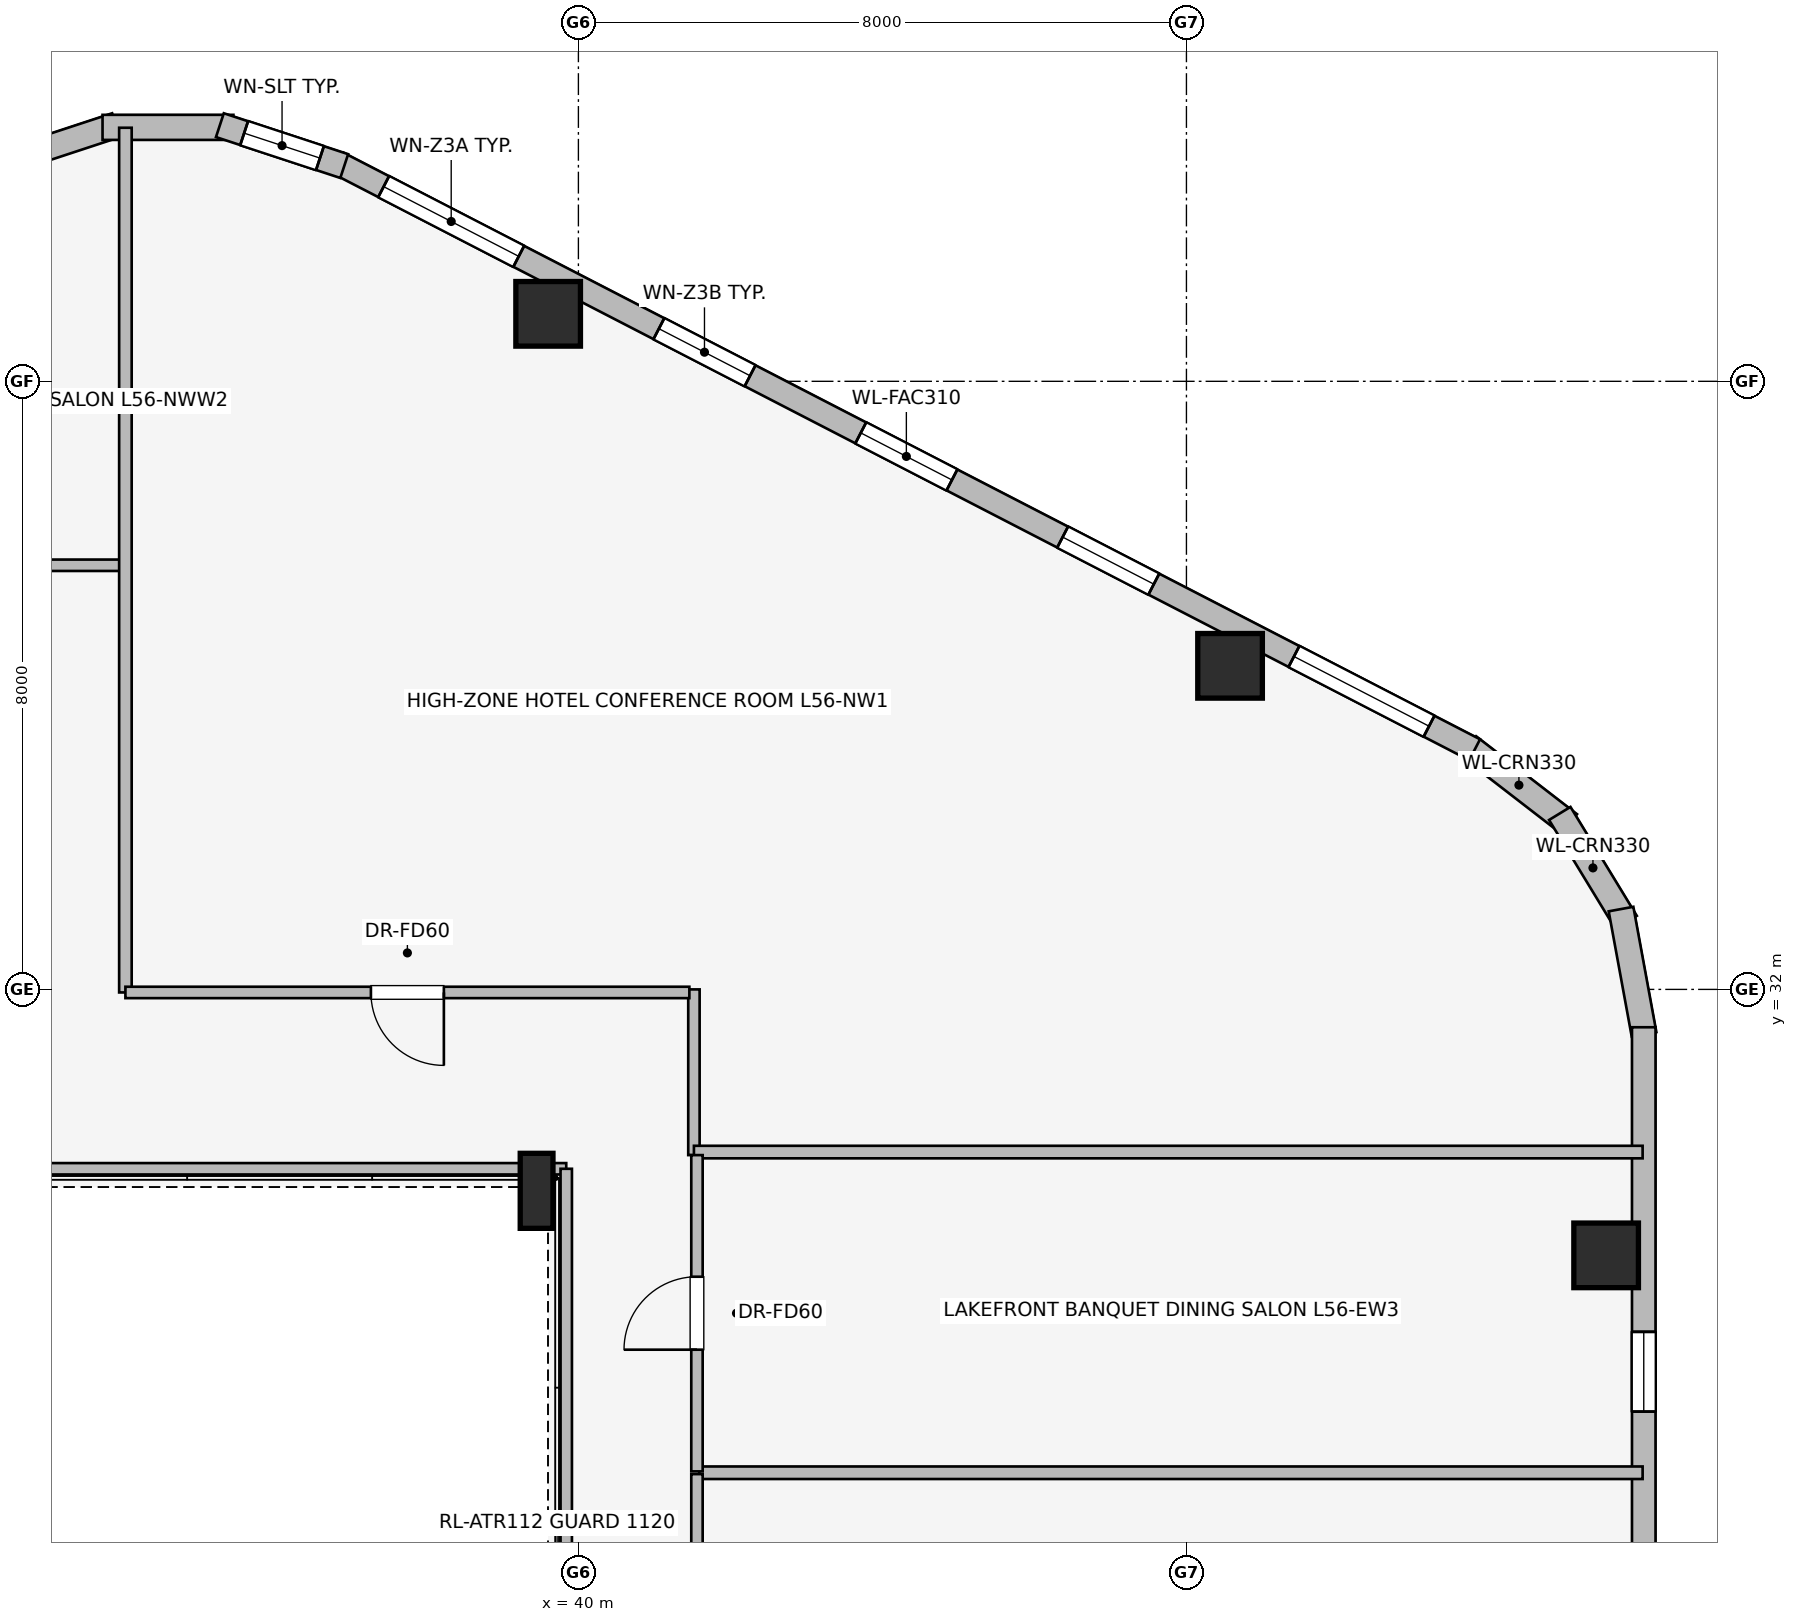
"""IFC4 building model, lengths in metres.
Left out: names, types, materials, properties, quantities, classifications, styles, units other than length and angle.
Written with IfcOpenShell. Run it as: python <this file> out.ifc"""

import sys

from ifc_helpers import new_model, si_unit, direction, frame, frame_2d, origin, origin_2d, place, context, subcontext, project, spatial, rectangle, i_section, extrude, element, fill, save


model = new_model("IFC4")
c1 = context("Model", 3, precision=1e-05, world=origin(), true_north=direction((0.0, 1.0)))
c2 = subcontext(c1, "Body", "Model", "MODEL_VIEW")
j1 = project(units=[si_unit("LENGTHUNIT", "METRE"), si_unit("PLANEANGLEUNIT", "RADIAN")], contexts=[c1])
p1 = place(None, origin())
s1 = spatial("IfcSite", under=j1, at=p1, CompositionType="ELEMENT")
p2 = place(p1, origin())
s2 = spatial("IfcBuilding", under=s1, at=p2, CompositionType="ELEMENT")
p3 = place(p2, frame((0.0, 0.0, 206.8)))
s3 = spatial("IfcBuildingStorey", under=s2, at=p3, CompositionType="ELEMENT", Elevation=206.8)
for number, where, z_axis, x_axis in (
    (1, (48.574, 36.257, 0.0), (0.0, 0.0, 1.0), (1.0, 0.0, 0.0)),
    (2, (39.602, 40.888, 0.0), (0.0, 0.0, 1.0), (1.0, 0.0, 0.0)),
    (3, (53.522, 28.501, 0.0), (0.0, 0.0, 1.0), (1.0, 0.0, 0.0)),
):
    element("IfcColumn", number, at=place(p3, frame(where, z_axis=z_axis, x_axis=x_axis)), inside=s3, PredefinedType="COLUMN", context=c2, shape_type="SweptSolid", body=[
        extrude(rectangle(XDim=0.85, YDim=0.85, at=origin_2d()), origin(), (0.0, 0.0, 1.0), 3.45),
    ])
p4 = place(p3, frame((39.45, 29.35, 0.0), z_axis=(0.0, 0.0, 1.0), x_axis=(1.0, 0.0, 0.0)))
e4 = element("IfcColumn", 4, at=p4, inside=s3, PredefinedType="COLUMN", context=c2, shape_type="SweptSolid", body=[
    extrude(i_section(OverallWidth=0.431, OverallDepth=0.987, WebThickness=0.034, FlangeThickness=0.062, at=origin_2d()), origin(), (0.0, 0.0, 1.0), 3.45),
])
p5 = place(p3, frame((51.711, 35.2, 0.0), z_axis=(0.0, 0.0, 1.0), x_axis=(0.791464279355, -0.611215423976, 0.0)))
e5 = element("IfcWall", 5, at=p5, inside=s3, PredefinedType="STANDARD", context=c2, shape_type="SweptSolid", body=[
    extrude(rectangle(XDim=1.677, YDim=0.33, at=frame_2d((0.838, 0.0))), origin(), (0.0, 0.0, 1.0), 3.19),
])
p6 = place(p3, frame((52.912, 34.315, 0.0), z_axis=(0.0, 0.0, 1.0), x_axis=(0.520219286058, -0.85403272444, 0.0)))
e6 = element("IfcWall", 6, at=p6, inside=s3, PredefinedType="STANDARD", context=c2, shape_type="SweptSolid", body=[
    extrude(rectangle(XDim=1.678, YDim=0.33, at=frame_2d((0.839, 0.0))), origin(), (0.0, 0.0, 1.0), 3.19),
])
p7 = place(p3, frame((53.718, 33.057, 0.0), z_axis=(0.0, 0.0, 1.0), x_axis=(0.180717642671, -0.983535019014, 0.0)))
e7 = element("IfcWall", 7, at=p7, inside=s3, PredefinedType="STANDARD", context=c2, shape_type="SweptSolid", body=[
    extrude(rectangle(XDim=1.677, YDim=0.33, at=frame_2d((0.838, 0.0))), origin(), (0.0, 0.0, 1.0), 3.19),
])
p8 = place(p3, frame((36.838, 42.871, 0.0), z_axis=(0.0, 0.0, 1.0), x_axis=(0.888626188278, -0.458632202867, 0.0)))
e8 = element("IfcWall", 8, at=p8, inside=s3, PredefinedType="STANDARD", context=c2, shape_type="SweptSolid", body=[
    extrude(rectangle(XDim=16.828, YDim=0.31, at=frame_2d((8.414, 0.0))), origin(), (0.0, 0.0, 1.0), 3.19),
])
p9 = place(p8, frame((0.675, 0.0, 0.75)))
e9 = element("IfcOpeningElement", 9, at=p9, cuts=e8, PredefinedType="OPENING", context=c2, shape_type="SweptSolid", body=[
    extrude(rectangle(XDim=2.0, YDim=1.5, at=frame_2d((1.0, 0.75))), frame((0.0, 0.165, 0.0), z_axis=(0.0, -1.0, 0.0), x_axis=(1.0, 0.0, 0.0)), (0.0, 0.0, 1.0), 0.33),
])
p10 = place(p8, frame((4.75, 0.0, 0.75)))
e10 = element("IfcOpeningElement", 10, at=p10, cuts=e8, PredefinedType="OPENING", context=c2, shape_type="SweptSolid", body=[
    extrude(rectangle(XDim=1.35, YDim=1.45, at=frame_2d((0.675, 0.725))), frame((0.0, 0.165, 0.0), z_axis=(0.0, -1.0, 0.0), x_axis=(1.0, 0.0, 0.0)), (0.0, 0.0, 1.0), 0.33),
])
p11 = place(p8, frame((7.739, 0.0, 0.75)))
e11 = element("IfcOpeningElement", 11, at=p11, cuts=e8, PredefinedType="OPENING", context=c2, shape_type="SweptSolid", body=[
    extrude(rectangle(XDim=1.35, YDim=1.45, at=frame_2d((0.675, 0.725))), frame((0.0, 0.165, 0.0), z_axis=(0.0, -1.0, 0.0), x_axis=(1.0, 0.0, 0.0)), (0.0, 0.0, 1.0), 0.33),
])
p12 = place(p8, frame((10.728, 0.0, 0.75)))
e12 = element("IfcOpeningElement", 12, at=p12, cuts=e8, PredefinedType="OPENING", context=c2, shape_type="SweptSolid", body=[
    extrude(rectangle(XDim=1.35, YDim=1.45, at=frame_2d((0.675, 0.725))), frame((0.0, 0.165, 0.0), z_axis=(0.0, -1.0, 0.0), x_axis=(1.0, 0.0, 0.0)), (0.0, 0.0, 1.0), 0.33),
])
p13 = place(p8, frame((14.153, 0.0, 0.75)))
e13 = element("IfcOpeningElement", 13, at=p13, cuts=e8, PredefinedType="OPENING", context=c2, shape_type="SweptSolid", body=[
    extrude(rectangle(XDim=2.0, YDim=1.5, at=frame_2d((1.0, 0.75))), frame((0.0, 0.165, 0.0), z_axis=(0.0, -1.0, 0.0), x_axis=(1.0, 0.0, 0.0)), (0.0, 0.0, 1.0), 0.33),
])
p14 = place(p3, frame((32.281, 42.832, 0.0), z_axis=(0.0, 0.0, 1.0), x_axis=(0.949937416267, 0.312440242569, 0.0)))
e14 = element("IfcWall", 14, at=p14, inside=s3, PredefinedType="STANDARD", context=c2, shape_type="SweptSolid", body=[
    extrude(rectangle(XDim=1.722, YDim=0.33, at=frame_2d((0.861, 0.0))), origin(), (0.0, 0.0, 1.0), 3.19),
])
p15 = place(p3, frame((33.739, 43.341, 0.0), z_axis=(0.0, 0.0, 1.0), x_axis=(1.0, 0.0, 0.0)))
e15 = element("IfcWall", 15, at=p15, inside=s3, PredefinedType="STANDARD", context=c2, shape_type="SweptSolid", body=[
    extrude(rectangle(XDim=1.722, YDim=0.33, at=frame_2d((0.861, 0.0))), origin(), (0.0, 0.0, 1.0), 3.19),
])
p16 = place(p3, frame((35.283, 43.37, 0.0), z_axis=(0.0, 0.0, 1.0), x_axis=(0.949937416267, -0.312440242569, 0.0)))
e16 = element("IfcWall", 16, at=p16, inside=s3, PredefinedType="STANDARD", context=c2, shape_type="SweptSolid", body=[
    extrude(rectangle(XDim=1.722, YDim=0.33, at=frame_2d((0.861, 0.0))), origin(), (0.0, 0.0, 1.0), 3.19),
])
p17 = place(p16, frame((0.336, 0.0, 0.75)))
e17 = element("IfcOpeningElement", 17, at=p17, cuts=e16, PredefinedType="OPENING", context=c2, shape_type="SweptSolid", body=[
    extrude(rectangle(XDim=1.05, YDim=1.4, at=frame_2d((0.525, 0.7))), frame((0.0, 0.175, 0.0), z_axis=(0.0, -1.0, 0.0), x_axis=(1.0, 0.0, 0.0)), (0.0, 0.0, 1.0), 0.35),
])
p18 = place(p3, frame((54.017, 31.502, 0.0), z_axis=(0.0, 0.0, 1.0), x_axis=(0.0, -1.0, 0.0)))
e18 = element("IfcWall", 18, at=p18, inside=s3, PredefinedType="STANDARD", context=c2, shape_type="SweptSolid", body=[
    extrude(rectangle(XDim=15.004, YDim=0.31, at=frame_2d((7.502, 0.0))), origin(), (0.0, 0.0, 1.0), 3.19),
])
p19 = place(p18, frame((4.007, 0.0, 0.75)))
e19 = element("IfcOpeningElement", 19, at=p19, cuts=e18, PredefinedType="OPENING", context=c2, shape_type="SweptSolid", body=[
    extrude(rectangle(XDim=1.05, YDim=1.4, at=frame_2d((0.525, 0.7))), frame((0.0, 0.165, 0.0), z_axis=(0.0, -1.0, 0.0), x_axis=(1.0, 0.0, 0.0)), (0.0, 0.0, 1.0), 0.33),
])
p20 = place(p18, frame((6.833, 0.0, 0.75)))
e20 = element("IfcOpeningElement", 20, at=p20, cuts=e18, PredefinedType="OPENING", context=c2, shape_type="SweptSolid", body=[
    extrude(rectangle(XDim=1.35, YDim=1.45, at=frame_2d((0.675, 0.725))), frame((0.0, 0.165, 0.0), z_axis=(0.0, -1.0, 0.0), x_axis=(1.0, 0.0, 0.0)), (0.0, 0.0, 1.0), 0.33),
])
p21 = place(p18, frame((9.953, 0.0, 0.75)))
e21 = element("IfcOpeningElement", 21, at=p21, cuts=e18, PredefinedType="OPENING", context=c2, shape_type="SweptSolid", body=[
    extrude(rectangle(XDim=1.05, YDim=1.4, at=frame_2d((0.525, 0.7))), frame((0.0, 0.165, 0.0), z_axis=(0.0, -1.0, 0.0), x_axis=(1.0, 0.0, 0.0)), (0.0, 0.0, 1.0), 0.33),
])
p22 = place(p3, frame((39.84, 29.64, 0.0), z_axis=(0.0, 0.0, 1.0), x_axis=(-1.0, 0.0, 0.0)))
e22 = element("IfcWall", 22, at=p22, inside=s3, PredefinedType="PARTITIONING", context=c2, shape_type="SweptSolid", body=[
    extrude(rectangle(XDim=12.203, YDim=0.15, at=frame_2d((6.102, 0.0))), origin(), (0.0, 0.0, 1.0), 2.331),
])
p23 = place(p3, frame((39.84, 18.36, 0.0), z_axis=(0.0, 0.0, 1.0), x_axis=(0.0, 1.0, 0.0)))
e23 = element("IfcWall", 23, at=p23, inside=s3, PredefinedType="PARTITIONING", context=c2, shape_type="SweptSolid", body=[
    extrude(rectangle(XDim=11.28, YDim=0.15, at=frame_2d((5.64, 0.0))), origin(), (0.0, 0.0, 1.0), 3.19),
])
p24 = place(p3, frame((33.962, 37.58, 0.0), z_axis=(0.0, 0.0, 1.0), x_axis=(-1.0, 0.0, 0.0)))
e24 = element("IfcWall", 24, at=p24, inside=s3, PredefinedType="PARTITIONING", context=c2, shape_type="SweptSolid", body=[
    extrude(rectangle(XDim=5.836, YDim=0.15, at=frame_2d((2.918, 0.0))), origin(), (0.0, 0.0, 1.0), 2.582),
])
p25 = place(p24, frame((2.663, 0.0, 0.0)))
e25 = element("IfcOpeningElement", 25, at=p25, cuts=e24, PredefinedType="OPENING", context=c2, shape_type="SweptSolid", body=[
    extrude(rectangle(XDim=0.96, YDim=2.0, at=frame_2d((0.48, 1.0))), frame((0.0, 0.085, 0.0), z_axis=(0.0, -1.0, 0.0), x_axis=(1.0, 0.0, 0.0)), (0.0, 0.0, 1.0), 0.17),
])
p26 = place(p3, frame((34.04, 31.96, 0.0), z_axis=(0.0, 0.0, 1.0), x_axis=(0.0, 1.0, 0.0)))
e26 = element("IfcWall", 26, at=p26, inside=s3, PredefinedType="PARTITIONING", context=c2, shape_type="SweptSolid", body=[
    extrude(rectangle(XDim=11.376, YDim=0.165, at=frame_2d((5.688, 0.0))), origin(), (0.0, 0.0, 1.0), 3.19),
])
p27 = place(p3, frame((41.52, 29.82, 0.0), z_axis=(0.0, 0.0, 1.0), x_axis=(0.0, 1.0, 0.0)))
e27 = element("IfcWall", 27, at=p27, inside=s3, PredefinedType="PARTITIONING", context=c2, shape_type="SweptSolid", body=[
    extrude(rectangle(XDim=2.18, YDim=0.15, at=frame_2d((1.09, 0.0))), origin(), (0.0, 0.0, 1.0), 3.19),
])
p28 = place(p3, frame((41.46, 31.96, 0.0), z_axis=(0.0, 0.0, 1.0), x_axis=(-1.0, 0.0, 0.0)))
e28 = element("IfcWall", 28, at=p28, inside=s3, PredefinedType="PARTITIONING", context=c2, shape_type="SweptSolid", body=[
    extrude(rectangle(XDim=7.42, YDim=0.15, at=frame_2d((3.71, 0.0))), origin(), (0.0, 0.0, 1.0), 3.19),
])
p29 = place(p28, frame((3.23, 0.0, 0.0)))
e29 = element("IfcOpeningElement", 29, at=p29, cuts=e28, PredefinedType="OPENING", context=c2, shape_type="SweptSolid", body=[
    extrude(rectangle(XDim=0.96, YDim=2.0, at=frame_2d((0.48, 1.0))), frame((0.0, 0.085, 0.0), z_axis=(0.0, -1.0, 0.0), x_axis=(1.0, 0.0, 0.0)), (0.0, 0.0, 1.0), 0.17),
])
p30 = place(p3, frame((41.52, 29.86, 0.0), z_axis=(0.0, 0.0, 1.0), x_axis=(1.0, 0.0, 0.0)))
e30 = element("IfcWall", 30, at=p30, inside=s3, PredefinedType="PARTITIONING", context=c2, shape_type="SweptSolid", body=[
    extrude(rectangle(XDim=12.482, YDim=0.165, at=frame_2d((6.241, 0.0))), origin(), (0.0, 0.0, 1.0), 3.19),
])
p31 = place(p3, frame((41.59, 25.641, 0.0), z_axis=(0.0, 0.0, 1.0), x_axis=(1.0, 0.0, 0.0)))
e31 = element("IfcWall", 31, at=p31, inside=s3, PredefinedType="PARTITIONING", context=c2, shape_type="SweptSolid", body=[
    extrude(rectangle(XDim=12.412, YDim=0.165, at=frame_2d((6.206, 0.0))), origin(), (0.0, 0.0, 1.0), 3.19),
])
p32 = place(p3, frame((41.56, 22.365, 0.0), z_axis=(0.0, 0.0, 1.0), x_axis=(0.0, 1.0, 0.0)))
e32 = element("IfcWall", 32, at=p32, inside=s3, PredefinedType="PARTITIONING", context=c2, shape_type="SweptSolid", body=[
    extrude(rectangle(XDim=3.258, YDim=0.15, at=frame_2d((1.629, 0.0))), origin(), (0.0, 0.0, 1.0), 3.19),
])
p33 = place(p32, frame((1.149, 0.0, 0.0)))
e33 = element("IfcOpeningElement", 33, at=p33, cuts=e32, PredefinedType="OPENING", context=c2, shape_type="SweptSolid", body=[
    extrude(rectangle(XDim=0.96, YDim=2.0, at=frame_2d((0.48, 1.0))), frame((0.0, 0.085, 0.0), z_axis=(0.0, -1.0, 0.0), x_axis=(1.0, 0.0, 0.0)), (0.0, 0.0, 1.0), 0.17),
])
p34 = place(p3, frame((41.56, 25.659, 0.0), z_axis=(0.0, 0.0, 1.0), x_axis=(0.0, 1.0, 0.0)))
e34 = element("IfcWall", 34, at=p34, inside=s3, PredefinedType="PARTITIONING", context=c2, shape_type="SweptSolid", body=[
    extrude(rectangle(XDim=4.161, YDim=0.15, at=frame_2d((2.081, 0.0))), origin(), (0.0, 0.0, 1.0), 3.19),
])
p35 = place(p34, frame((1.601, 0.0, 0.0)))
e35 = element("IfcOpeningElement", 35, at=p35, cuts=e34, PredefinedType="OPENING", context=c2, shape_type="SweptSolid", body=[
    extrude(rectangle(XDim=0.96, YDim=2.0, at=frame_2d((0.48, 1.0))), frame((0.0, 0.085, 0.0), z_axis=(0.0, -1.0, 0.0), x_axis=(1.0, 0.0, 0.0)), (0.0, 0.0, 1.0), 0.17),
])
p36 = place(p9, origin())
e36 = element("IfcWindow", 36, at=p36, inside=s3, PartitioningType="SINGLE_PANEL", PredefinedType="WINDOW", context=c2, shape_type="SweptSolid", body=[
    extrude(rectangle(XDim=2.0, YDim=1.5, at=frame_2d((1.0, 0.75))), frame((0.0, 0.03, 0.0), z_axis=(0.0, -1.0, 0.0), x_axis=(1.0, 0.0, 0.0)), (0.0, 0.0, 1.0), 0.06),
])
fill(e9, e36)
p37 = place(p10, origin())
e37 = element("IfcWindow", 37, at=p37, inside=s3, PartitioningType="SINGLE_PANEL", PredefinedType="WINDOW", context=c2, shape_type="SweptSolid", body=[
    extrude(rectangle(XDim=1.35, YDim=1.45, at=frame_2d((0.675, 0.725))), frame((0.0, 0.03, 0.0), z_axis=(0.0, -1.0, 0.0), x_axis=(1.0, 0.0, 0.0)), (0.0, 0.0, 1.0), 0.06),
])
fill(e10, e37)
p38 = place(p11, origin())
e38 = element("IfcWindow", 38, at=p38, inside=s3, PartitioningType="SINGLE_PANEL", PredefinedType="WINDOW", context=c2, shape_type="SweptSolid", body=[
    extrude(rectangle(XDim=1.35, YDim=1.45, at=frame_2d((0.675, 0.725))), frame((0.0, 0.03, 0.0), z_axis=(0.0, -1.0, 0.0), x_axis=(1.0, 0.0, 0.0)), (0.0, 0.0, 1.0), 0.06),
])
fill(e11, e38)
p39 = place(p12, origin())
e39 = element("IfcWindow", 39, at=p39, inside=s3, PartitioningType="SINGLE_PANEL", PredefinedType="WINDOW", context=c2, shape_type="SweptSolid", body=[
    extrude(rectangle(XDim=1.35, YDim=1.45, at=frame_2d((0.675, 0.725))), frame((0.0, 0.03, 0.0), z_axis=(0.0, -1.0, 0.0), x_axis=(1.0, 0.0, 0.0)), (0.0, 0.0, 1.0), 0.06),
])
fill(e12, e39)
p40 = place(p13, origin())
e40 = element("IfcWindow", 40, at=p40, inside=s3, PartitioningType="SINGLE_PANEL", PredefinedType="WINDOW", context=c2, shape_type="SweptSolid", body=[
    extrude(rectangle(XDim=2.0, YDim=1.5, at=frame_2d((1.0, 0.75))), frame((0.0, 0.03, 0.0), z_axis=(0.0, -1.0, 0.0), x_axis=(1.0, 0.0, 0.0)), (0.0, 0.0, 1.0), 0.06),
])
fill(e13, e40)
p41 = place(p17, origin())
e41 = element("IfcWindow", 41, at=p41, inside=s3, PartitioningType="SINGLE_PANEL", PredefinedType="WINDOW", context=c2, shape_type="SweptSolid", body=[
    extrude(rectangle(XDim=1.05, YDim=1.4, at=frame_2d((0.525, 0.7))), frame((0.0, 0.03, 0.0), z_axis=(0.0, -1.0, 0.0), x_axis=(1.0, 0.0, 0.0)), (0.0, 0.0, 1.0), 0.06),
])
fill(e17, e41)
p42 = place(p19, origin())
e42 = element("IfcWindow", 42, at=p42, inside=s3, PartitioningType="SINGLE_PANEL", PredefinedType="WINDOW", context=c2, shape_type="SweptSolid", body=[
    extrude(rectangle(XDim=1.05, YDim=1.4, at=frame_2d((0.525, 0.7))), frame((0.0, 0.03, 0.0), z_axis=(0.0, -1.0, 0.0), x_axis=(1.0, 0.0, 0.0)), (0.0, 0.0, 1.0), 0.06),
])
fill(e19, e42)
p43 = place(p29, origin())
e43 = element("IfcDoor", 43, at=p43, inside=s3, OperationType="SINGLE_SWING_LEFT", PredefinedType="DOOR", context=c2, shape_type="SweptSolid", body=[
    extrude(rectangle(XDim=0.96, YDim=2.0, at=frame_2d((0.48, 1.0))), frame((0.0, 0.025, 0.0), z_axis=(0.0, -1.0, 0.0), x_axis=(1.0, 0.0, 0.0)), (0.0, 0.0, 1.0), 0.05),
])
fill(e29, e43)
p44 = place(p35, origin())
e44 = element("IfcDoor", 44, at=p44, inside=s3, OperationType="SINGLE_SWING_LEFT", PredefinedType="DOOR", context=c2, shape_type="SweptSolid", body=[
    extrude(rectangle(XDim=0.96, YDim=2.0, at=frame_2d((0.48, 1.0))), frame((0.0, 0.025, 0.0), z_axis=(0.0, -1.0, 0.0), x_axis=(1.0, 0.0, 0.0)), (0.0, 0.0, 1.0), 0.05),
])
fill(e35, e44)
save(model, sys.argv[1])
